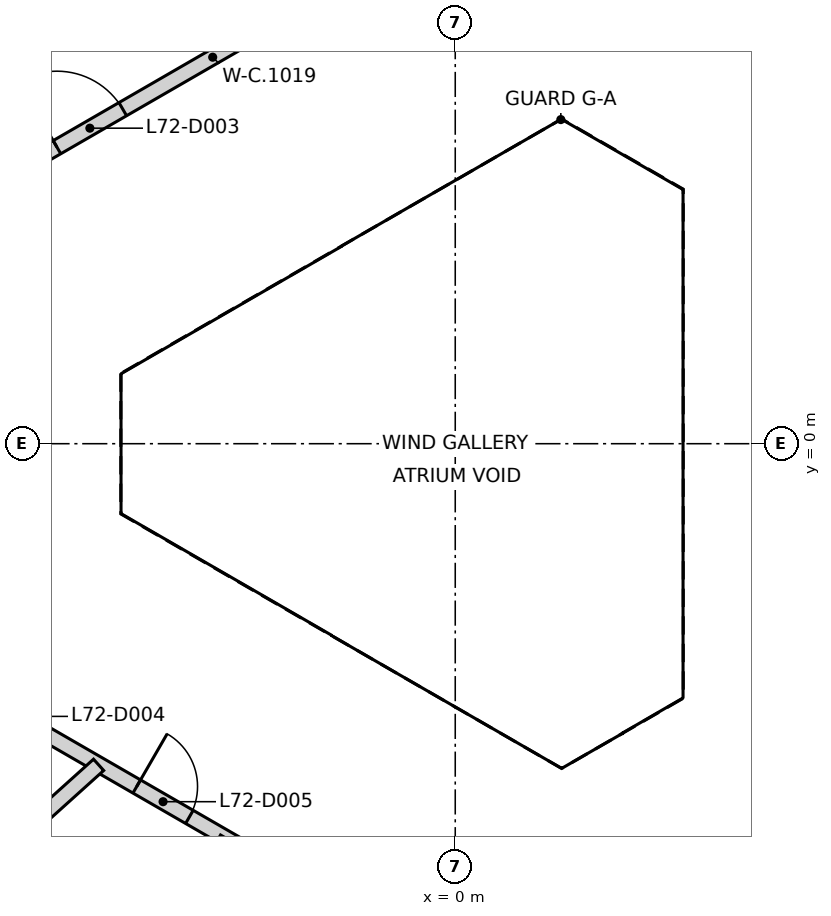
"""IFC4 building model, lengths in metres.
Left out: names, types, materials, properties, quantities, classifications, styles, units other than length and angle.
Written with IfcOpenShell. Run it as: python <this file> out.ifc"""

import sys

from ifc_helpers import new_model, si_unit, direction, frame, frame_2d, origin, place, context, subcontext, project, spatial, rectangle, extrude, element, fill, save


model = new_model("IFC4")
c1 = context("Model", 3, precision=1e-05, world=origin(), true_north=direction((0.0, 1.0)))
c2 = subcontext(c1, "Body", "Model", "MODEL_VIEW")
j1 = project(units=[si_unit("LENGTHUNIT", "METRE"), si_unit("PLANEANGLEUNIT", "RADIAN")], contexts=[c1])
p1 = place(None, origin())
s1 = spatial("IfcSite", under=j1, at=p1, CompositionType="ELEMENT")
p2 = place(p1, origin())
s2 = spatial("IfcBuilding", under=s1, at=p2, CompositionType="ELEMENT")
p3 = place(p2, frame((0.0, 0.0, 283.8)))
s3 = spatial("IfcBuildingStorey", under=s2, at=p3, CompositionType="ELEMENT", Elevation=283.8)
p4 = place(p3, frame((-7.388, 2.659, 0.0), z_axis=(0.0, 0.0, 1.0), x_axis=(0.865840346806, 0.500320391192, 0.0)))
e1 = element("IfcWall", 1, at=p4, inside=s3, PredefinedType="PARTITIONING", context=c2, shape_type="SweptSolid", body=[
    extrude(rectangle(XDim=9.695, YDim=0.2, at=frame_2d((4.848, 0.0))), origin(), (0.0, 0.0, 1.0), 6.85),
])
p5 = place(p4, frame((7.318, 0.0, 0.0)))
e2 = element("IfcOpeningElement", 2, at=p5, cuts=e1, PredefinedType="OPENING", context=c2, shape_type="SweptSolid", body=[
    extrude(rectangle(XDim=1.0, YDim=2.1, at=frame_2d((0.5, 1.05))), frame((0.0, 0.11, 0.0), z_axis=(0.0, -1.0, 0.0), x_axis=(1.0, 0.0, 0.0)), (0.0, 0.0, 1.0), 0.22),
])
p6 = place(p4, frame((2.481, 0.0, 0.0)))
e3 = element("IfcOpeningElement", 3, at=p6, cuts=e1, PredefinedType="OPENING", context=c2, shape_type="SweptSolid", body=[
    extrude(rectangle(XDim=1.0, YDim=2.1, at=frame_2d((0.5, 1.05))), frame((0.0, 0.11, 0.0), z_axis=(0.0, -1.0, 0.0), x_axis=(1.0, 0.0, 0.0)), (0.0, 0.0, 1.0), 0.22),
])
p7 = place(p3, frame((-6.895, -2.948, 0.0), z_axis=(0.0, 0.0, 1.0), x_axis=(0.865991331413, -0.500059010435, 0.0)))
e4 = element("IfcWall", 4, at=p7, inside=s3, PredefinedType="PARTITIONING", context=c2, shape_type="SweptSolid", body=[
    extrude(rectangle(XDim=9.565, YDim=0.2, at=frame_2d((4.783, 0.0))), origin(), (0.0, 0.0, 1.0), 6.85),
])
p8 = place(p7, frame((0.879, 0.0, 0.0)))
e5 = element("IfcOpeningElement", 5, at=p8, cuts=e4, PredefinedType="OPENING", context=c2, shape_type="SweptSolid", body=[
    extrude(rectangle(XDim=0.8, YDim=2.1, at=frame_2d((0.4, 1.05))), frame((0.0, 0.11, 0.0), z_axis=(0.0, -1.0, 0.0), x_axis=(1.0, 0.0, 0.0)), (0.0, 0.0, 1.0), 0.22),
])
p9 = place(p7, frame((3.123, 0.0, 0.0)))
e6 = element("IfcOpeningElement", 6, at=p9, cuts=e4, PredefinedType="OPENING", context=c2, shape_type="SweptSolid", body=[
    extrude(rectangle(XDim=0.8, YDim=2.1, at=frame_2d((0.4, 1.05))), frame((0.0, 0.11, 0.0), z_axis=(0.0, -1.0, 0.0), x_axis=(1.0, 0.0, 0.0)), (0.0, 0.0, 1.0), 0.22),
])
p10 = place(p7, frame((6.526, 0.0, 0.0)))
e7 = element("IfcOpeningElement", 7, at=p10, cuts=e4, PredefinedType="OPENING", context=c2, shape_type="SweptSolid", body=[
    extrude(rectangle(XDim=1.0, YDim=2.1, at=frame_2d((0.5, 1.05))), frame((0.0, 0.11, 0.0), z_axis=(0.0, -1.0, 0.0), x_axis=(1.0, 0.0, 0.0)), (0.0, 0.0, 1.0), 0.22),
])
p11 = place(p3, frame((-12.917, -11.631, 0.0), z_axis=(0.0, 0.0, 1.0), x_axis=(0.743160324176, 0.669113392909, 0.0)))
e8 = element("IfcWall", 8, at=p11, inside=s3, PredefinedType="PARTITIONING", context=c2, shape_type="SweptSolid", body=[
    extrude(rectangle(XDim=11.068, YDim=0.2, at=frame_2d((5.534, 0.0))), origin(), (0.0, 0.0, 1.0), 5.95),
])
p12 = place(p3, frame((-8.289, -14.358, 0.0), z_axis=(0.0, 0.0, 1.0), x_axis=(0.499979535923, 0.866037218403, 0.0)))
e9 = element("IfcWall", 9, at=p12, inside=s3, PredefinedType="PARTITIONING", context=c2, shape_type="SweptSolid", body=[
    extrude(rectangle(XDim=10.577, YDim=0.2, at=frame_2d((5.289, 0.0))), origin(), (0.0, 0.0, 1.0), 5.95),
])
p13 = place(p6, origin())
e10 = element("IfcDoor", 10, at=p13, inside=s3, OperationType="SINGLE_SWING_LEFT", PredefinedType="DOOR", context=c2, shape_type="SweptSolid", body=[
    extrude(rectangle(XDim=1.0, YDim=2.1, at=frame_2d((0.5, 1.05))), frame((0.0, 0.025, 0.0), z_axis=(0.0, -1.0, 0.0), x_axis=(1.0, 0.0, 0.0)), (0.0, 0.0, 1.0), 0.05),
])
fill(e3, e10)
p14 = place(p9, frame((0.8, 0.0, 0.0), z_axis=(0.0, 0.0, 1.0), x_axis=(-1.0, 0.0, 0.0)))
e11 = element("IfcDoor", 11, at=p14, inside=s3, OperationType="SINGLE_SWING_LEFT", PredefinedType="DOOR", context=c2, shape_type="SweptSolid", body=[
    extrude(rectangle(XDim=0.8, YDim=2.1, at=frame_2d((0.4, 1.05))), frame((0.0, 0.025, 0.0), z_axis=(0.0, -1.0, 0.0), x_axis=(1.0, 0.0, 0.0)), (0.0, 0.0, 1.0), 0.05),
])
fill(e6, e11)
save(model, sys.argv[1])
